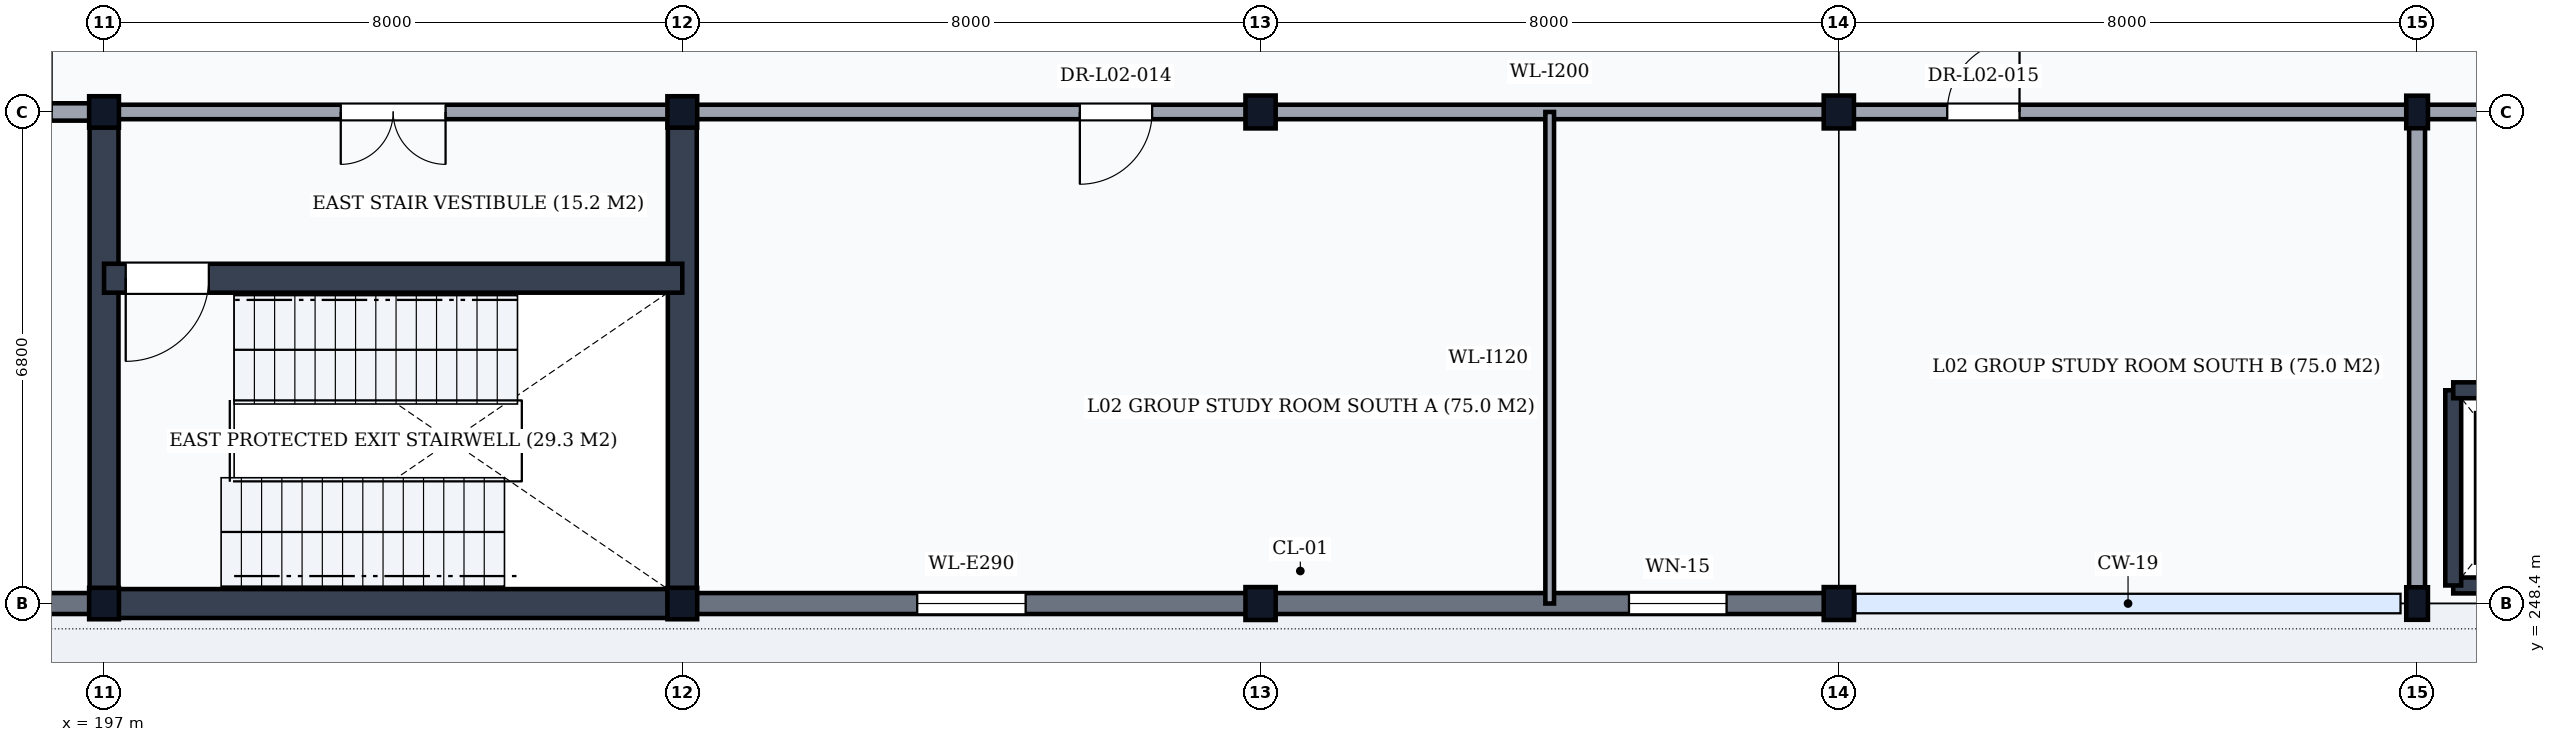
"""IFC4 building model, lengths in metres.
Left out: names, types, materials, properties, quantities, classifications, styles, units other than length and angle.
Written with IfcOpenShell. Run it as: python <this file> out.ifc"""

import sys

from ifc_helpers import new_model, si_unit, direction, frame, frame_2d, origin, origin_2d, place, context, subcontext, project, spatial, rectangle, i_section, extrude, element, fill, save


model = new_model("IFC4")
c1 = context("Model", 3, precision=1e-05, world=origin(), true_north=direction((0.0, 1.0)))
c2 = subcontext(c1, "Body", "Model", "MODEL_VIEW")
j1 = project(units=[si_unit("LENGTHUNIT", "METRE"), si_unit("PLANEANGLEUNIT", "RADIAN")], contexts=[c1])
p1 = place(None, origin())
s1 = spatial("IfcSite", under=j1, at=p1, CompositionType="ELEMENT")
p2 = place(p1, origin())
s2 = spatial("IfcBuilding", under=s1, at=p2, CompositionType="ELEMENT")
p3 = place(p2, frame((0.0, 0.0, 5.4)))
s3 = spatial("IfcBuildingStorey", under=s2, at=p3, CompositionType="ELEMENT", Elevation=5.4)
for number, where, z_axis, x_axis in (
    (1, (197.0, 248.4, 0.0), (0.0, 0.0, 1.0), (1.0, 0.0, 0.0)),
    (2, (197.0, 255.2, 0.0), (0.0, 0.0, 1.0), (1.0, 0.0, 0.0)),
    (3, (205.0, 248.4, 0.0), (0.0, 0.0, 1.0), (1.0, 0.0, 0.0)),
    (4, (205.0, 255.2, 0.0), (0.0, 0.0, 1.0), (1.0, 0.0, 0.0)),
):
    element("IfcColumn", number, at=place(p3, frame(where, z_axis=z_axis, x_axis=x_axis)), inside=s3, PredefinedType="COLUMN", context=c2, shape_type="SweptSolid", body=[
        extrude(i_section(OverallWidth=0.412, OverallDepth=0.435, WebThickness=0.036, FlangeThickness=0.057, FilletRadius=0.015, at=origin_2d()), origin(), (0.0, 0.0, 1.0), 5.1),
    ])
for number, where, z_axis, x_axis in (
    (5, (213.0, 248.4, 0.0), (0.0, 0.0, 1.0), (1.0, 0.0, 0.0)),
    (6, (213.0, 255.2, 0.0), (0.0, 0.0, 1.0), (1.0, 0.0, 0.0)),
    (7, (221.0, 248.4, 0.0), (0.0, 0.0, 1.0), (1.0, 0.0, 0.0)),
    (8, (221.0, 255.2, 0.0), (0.0, 0.0, 1.0), (1.0, 0.0, 0.0)),
):
    element("IfcColumn", number, at=place(p3, frame(where, z_axis=z_axis, x_axis=x_axis)), inside=s3, PredefinedType="COLUMN", context=c2, shape_type="SweptSolid", body=[
        extrude(i_section(OverallWidth=0.418, OverallDepth=0.455, WebThickness=0.042, FlangeThickness=0.068, FilletRadius=0.015, at=origin_2d()), origin(), (0.0, 0.0, 1.0), 5.1),
    ])
for number, where, z_axis, x_axis in (
    (9, (229.0, 248.4, 0.0), (0.0, 0.0, 1.0), (1.0, 0.0, 0.0)),
    (10, (229.0, 255.2, 0.0), (0.0, 0.0, 1.0), (1.0, 0.0, 0.0)),
):
    element("IfcColumn", number, at=place(p3, frame(where, z_axis=z_axis, x_axis=x_axis)), inside=s3, PredefinedType="COLUMN", context=c2, shape_type="SweptSolid", body=[
        extrude(i_section(OverallWidth=0.3, OverallDepth=0.45, WebThickness=0.014, FlangeThickness=0.026, FilletRadius=0.027, at=origin_2d()), origin(), (0.0, 0.0, 1.0), 5.1),
    ])
p4 = place(p3, frame((189.006, 248.4, 0.0), z_axis=(0.0, 0.0, 1.0), x_axis=(1.0, 0.0, 0.0)))
e11 = element("IfcWall", 11, at=p4, inside=s3, PredefinedType="SOLIDWALL", context=c2, shape_type="SweptSolid", body=[
    extrude(rectangle(XDim=7.988, YDim=0.29, at=frame_2d((3.994, 0.0))), origin(), (0.0, 0.0, 1.0), 4.548),
])
p5 = place(p3, frame((205.006, 248.4, 0.0), z_axis=(0.0, 0.0, 1.0), x_axis=(1.0, 0.0, 0.0)))
e12 = element("IfcWall", 12, at=p5, inside=s3, PredefinedType="SOLIDWALL", context=c2, shape_type="SweptSolid", body=[
    extrude(rectangle(XDim=7.988, YDim=0.29, at=frame_2d((3.994, 0.0))), origin(), (0.0, 0.0, 1.0), 4.548),
])
p6 = place(p5, frame((3.244, 0.0, 0.95)))
e13 = element("IfcOpeningElement", 13, at=p6, cuts=e12, PredefinedType="OPENING", context=c2, shape_type="SweptSolid", body=[
    extrude(rectangle(XDim=1.5, YDim=1.9, at=frame_2d((0.75, 0.95))), frame((0.0, 0.16, 0.0), z_axis=(0.0, -1.0, 0.0), x_axis=(1.0, 0.0, 0.0)), (0.0, 0.0, 1.0), 0.32),
])
p7 = place(p3, frame((213.006, 248.4, 0.0), z_axis=(0.0, 0.0, 1.0), x_axis=(1.0, 0.0, 0.0)))
e14 = element("IfcWall", 14, at=p7, inside=s3, PredefinedType="SOLIDWALL", context=c2, shape_type="SweptSolid", body=[
    extrude(rectangle(XDim=7.988, YDim=0.29, at=frame_2d((3.994, 0.0))), origin(), (0.0, 0.0, 1.0), 4.548),
])
p8 = place(p7, frame((5.091, 0.0, 0.95)))
e15 = element("IfcOpeningElement", 15, at=p8, cuts=e14, PredefinedType="OPENING", context=c2, shape_type="SweptSolid", body=[
    extrude(rectangle(XDim=1.35, YDim=1.8, at=frame_2d((0.675, 0.9))), frame((0.0, 0.16, 0.0), z_axis=(0.0, -1.0, 0.0), x_axis=(1.0, 0.0, 0.0)), (0.0, 0.0, 1.0), 0.32),
])
p9 = place(p3, frame((197.0, 248.4, 0.0), z_axis=(0.0, 0.0, 1.0), x_axis=(1.0, 0.0, 0.0)))
e16 = element("IfcWall", 16, at=p9, inside=s3, PredefinedType="SHEAR", context=c2, shape_type="SweptSolid", body=[
    extrude(rectangle(XDim=8.0, YDim=0.4, at=frame_2d((4.0, 0.0))), origin(), (0.0, 0.0, 1.0), 4.86),
])
for number, where, z_axis, x_axis in (
    (17, (197.0, 248.4, 0.0), (0.0, 0.0, 1.0), (0.0, 1.0, 0.0)),
    (18, (205.0, 248.4, 0.0), (0.0, 0.0, 1.0), (0.0, 1.0, 0.0)),
):
    element("IfcWall", number, at=place(p3, frame(where, z_axis=z_axis, x_axis=x_axis)), inside=s3, PredefinedType="SHEAR", context=c2, shape_type="SweptSolid", body=[
        extrude(rectangle(XDim=6.8, YDim=0.4, at=frame_2d((3.4, 0.0))), origin(), (0.0, 0.0, 1.0), 4.86),
    ])
p10 = place(p3, frame((197.0, 252.9, 0.0), z_axis=(0.0, 0.0, 1.0), x_axis=(1.0, 0.0, 0.0)))
e19 = element("IfcWall", 19, at=p10, inside=s3, PredefinedType="SHEAR", context=c2, shape_type="SweptSolid", body=[
    extrude(rectangle(XDim=8.0, YDim=0.4, at=frame_2d((4.0, 0.0))), origin(), (0.0, 0.0, 1.0), 4.86),
])
p11 = place(p10, frame((0.3, 0.0, 0.0)))
e20 = element("IfcOpeningElement", 20, at=p11, cuts=e19, PredefinedType="OPENING", context=c2, shape_type="SweptSolid", body=[
    extrude(rectangle(XDim=1.15, YDim=2.15, at=frame_2d((0.575, 1.075))), frame((0.0, 0.215, 0.0), z_axis=(0.0, -1.0, 0.0), x_axis=(1.0, 0.0, 0.0)), (0.0, 0.0, 1.0), 0.43),
])
p12 = place(p3, frame((197.0, 255.2, 0.0), z_axis=(0.0, 0.0, 1.0), x_axis=(1.0, 0.0, 0.0)))
e21 = element("IfcWall", 21, at=p12, inside=s3, PredefinedType="PARTITIONING", context=c2, shape_type="SweptSolid", body=[
    extrude(rectangle(XDim=8.0, YDim=0.2, at=frame_2d((4.0, 0.0))), origin(), (0.0, 0.0, 1.0), 4.358),
])
p13 = place(p12, frame((3.275, 0.0, 0.0)))
e22 = element("IfcOpeningElement", 22, at=p13, cuts=e21, PredefinedType="OPENING", context=c2, shape_type="SweptSolid", body=[
    extrude(rectangle(XDim=1.45, YDim=2.2, at=frame_2d((0.725, 1.1))), frame((0.0, 0.115, 0.0), z_axis=(0.0, -1.0, 0.0), x_axis=(1.0, 0.0, 0.0)), (0.0, 0.0, 1.0), 0.23),
])
p14 = place(p3, frame((229.5, 248.65, 0.0), z_axis=(0.0, 0.0, 1.0), x_axis=(1.0, 0.0, 0.0)))
e23 = element("IfcWall", 23, at=p14, inside=s3, PredefinedType="SHEAR", context=c2, shape_type="SweptSolid", body=[
    extrude(rectangle(XDim=2.2, YDim=0.22, at=frame_2d((1.1, 0.0))), origin(), (0.0, 0.0, 1.0), 4.86),
])
p15 = place(p3, frame((229.5, 248.65, 0.0), z_axis=(0.0, 0.0, 1.0), x_axis=(0.0, 1.0, 0.0)))
e24 = element("IfcWall", 24, at=p15, inside=s3, PredefinedType="SHEAR", context=c2, shape_type="SweptSolid", body=[
    extrude(rectangle(XDim=2.7, YDim=0.22, at=frame_2d((1.35, 0.0))), origin(), (0.0, 0.0, 1.0), 4.86),
])
p16 = place(p3, frame((229.5, 251.35, 0.0), z_axis=(0.0, 0.0, 1.0), x_axis=(1.0, 0.0, 0.0)))
e25 = element("IfcWall", 25, at=p16, inside=s3, PredefinedType="SHEAR", context=c2, shape_type="SweptSolid", body=[
    extrude(rectangle(XDim=2.2, YDim=0.22, at=frame_2d((1.1, 0.0))), origin(), (0.0, 0.0, 1.0), 4.86),
])
p17 = place(p16, frame((0.5, 0.0, 0.0)))
e26 = element("IfcOpeningElement", 26, at=p17, cuts=e25, PredefinedType="OPENING", context=c2, shape_type="SweptSolid", body=[
    extrude(rectangle(XDim=1.2, YDim=2.2, at=frame_2d((0.6, 1.1))), frame((0.0, 0.125, 0.0), z_axis=(0.0, -1.0, 0.0), x_axis=(1.0, 0.0, 0.0)), (0.0, 0.0, 1.0), 0.25),
])
p18 = place(p3, frame((189.0, 255.2, 0.0), z_axis=(0.0, 0.0, 1.0), x_axis=(1.0, 0.0, 0.0)))
e27 = element("IfcWall", 27, at=p18, inside=s3, PredefinedType="PARTITIONING", context=c2, shape_type="SweptSolid", body=[
    extrude(rectangle(XDim=8.0, YDim=0.24, at=frame_2d((4.0, 0.0))), origin(), (0.0, 0.0, 1.0), 4.358),
])
p19 = place(p18, frame((1.05, 0.0, 0.0)))
e28 = element("IfcOpeningElement", 28, at=p19, cuts=e27, PredefinedType="OPENING", context=c2, shape_type="SweptSolid", body=[
    extrude(rectangle(XDim=1.0, YDim=2.1, at=frame_2d((0.5, 1.05))), frame((0.0, 0.135, 0.0), z_axis=(0.0, -1.0, 0.0), x_axis=(1.0, 0.0, 0.0)), (0.0, 0.0, 1.0), 0.27),
])
p20 = place(p18, frame((3.6, 0.0, 0.0)))
e29 = element("IfcOpeningElement", 29, at=p20, cuts=e27, PredefinedType="OPENING", context=c2, shape_type="SweptSolid", body=[
    extrude(rectangle(XDim=1.5, YDim=2.25, at=frame_2d((0.75, 1.125))), frame((0.0, 0.135, 0.0), z_axis=(0.0, -1.0, 0.0), x_axis=(1.0, 0.0, 0.0)), (0.0, 0.0, 1.0), 0.27),
])
p21 = place(p18, frame((6.425, 0.0, 0.0)))
e30 = element("IfcOpeningElement", 30, at=p21, cuts=e27, PredefinedType="OPENING", context=c2, shape_type="SweptSolid", body=[
    extrude(rectangle(XDim=0.85, YDim=2.1, at=frame_2d((0.425, 1.05))), frame((0.0, 0.135, 0.0), z_axis=(0.0, -1.0, 0.0), x_axis=(1.0, 0.0, 0.0)), (0.0, 0.0, 1.0), 0.27),
])
p22 = place(p3, frame((229.0, 248.4, 0.0), z_axis=(0.0, 0.0, 1.0), x_axis=(0.0, 1.0, 0.0)))
e31 = element("IfcWall", 31, at=p22, inside=s3, PredefinedType="PARTITIONING", context=c2, shape_type="SweptSolid", body=[
    extrude(rectangle(XDim=6.8, YDim=0.22, at=frame_2d((3.4, 0.0))), origin(), (0.0, 0.0, 1.0), 4.498),
])
p23 = place(p3, frame((229.0, 255.2, 0.0), z_axis=(0.0, 0.0, 1.0), x_axis=(1.0, 0.0, 0.0)))
e32 = element("IfcWall", 32, at=p23, inside=s3, PredefinedType="PARTITIONING", context=c2, shape_type="SweptSolid", body=[
    extrude(rectangle(XDim=8.0, YDim=0.2, at=frame_2d((4.0, 0.0))), origin(), (0.0, 0.0, 1.0), 4.408),
])
p24 = place(p23, frame((3.1, 0.0, 0.0)))
e33 = element("IfcOpeningElement", 33, at=p24, cuts=e32, PredefinedType="OPENING", context=c2, shape_type="SweptSolid", body=[
    extrude(rectangle(XDim=1.8, YDim=2.4, at=frame_2d((0.9, 1.2))), frame((0.0, 0.115, 0.0), z_axis=(0.0, -1.0, 0.0), x_axis=(1.0, 0.0, 0.0)), (0.0, 0.0, 1.0), 0.23),
])
p25 = place(p3, frame((205.0, 255.2, 0.0), z_axis=(0.0, 0.0, 1.0), x_axis=(1.0, 0.0, 0.0)))
e34 = element("IfcWall", 34, at=p25, inside=s3, PredefinedType="PARTITIONING", context=c2, shape_type="SweptSolid", body=[
    extrude(rectangle(XDim=24.0, YDim=0.2, at=frame_2d((12.0, 0.0))), origin(), (0.0, 0.0, 1.0), 4.358),
])
p26 = place(p25, frame((5.5, 0.0, 0.0)))
e35 = element("IfcOpeningElement", 35, at=p26, cuts=e34, PredefinedType="OPENING", context=c2, shape_type="SweptSolid", body=[
    extrude(rectangle(XDim=1.0, YDim=2.1, at=frame_2d((0.5, 1.05))), frame((0.0, 0.115, 0.0), z_axis=(0.0, -1.0, 0.0), x_axis=(1.0, 0.0, 0.0)), (0.0, 0.0, 1.0), 0.23),
])
p27 = place(p25, frame((17.5, 0.0, 0.0)))
e36 = element("IfcOpeningElement", 36, at=p27, cuts=e34, PredefinedType="OPENING", context=c2, shape_type="SweptSolid", body=[
    extrude(rectangle(XDim=1.0, YDim=2.1, at=frame_2d((0.5, 1.05))), frame((0.0, 0.115, 0.0), z_axis=(0.0, -1.0, 0.0), x_axis=(1.0, 0.0, 0.0)), (0.0, 0.0, 1.0), 0.23),
])
p28 = place(p3, frame((217.0, 248.4, 0.0), z_axis=(0.0, 0.0, 1.0), x_axis=(0.0, 1.0, 0.0)))
e37 = element("IfcWall", 37, at=p28, inside=s3, PredefinedType="PARTITIONING", context=c2, shape_type="SweptSolid", body=[
    extrude(rectangle(XDim=6.8, YDim=0.12, at=frame_2d((3.4, 0.0))), origin(), (0.0, 0.0, 1.0), 4.618),
])
p29 = place(p6, origin())
e38 = element("IfcWindow", 38, at=p29, inside=s3, PartitioningType="SINGLE_PANEL", PredefinedType="WINDOW", context=c2, shape_type="SweptSolid", body=[
    extrude(rectangle(XDim=1.5, YDim=1.9, at=frame_2d((0.75, 0.95))), frame((0.0, 0.03, 0.0), z_axis=(0.0, -1.0, 0.0), x_axis=(1.0, 0.0, 0.0)), (0.0, 0.0, 1.0), 0.06),
])
fill(e13, e38)
p30 = place(p8, origin())
e39 = element("IfcWindow", 39, at=p30, inside=s3, PartitioningType="SINGLE_PANEL", PredefinedType="WINDOW", context=c2, shape_type="SweptSolid", body=[
    extrude(rectangle(XDim=1.35, YDim=1.8, at=frame_2d((0.675, 0.9))), frame((0.0, 0.03, 0.0), z_axis=(0.0, -1.0, 0.0), x_axis=(1.0, 0.0, 0.0)), (0.0, 0.0, 1.0), 0.06),
])
fill(e15, e39)
p31 = place(p11, frame((1.15, 0.0, 0.0), z_axis=(0.0, 0.0, 1.0), x_axis=(-1.0, 0.0, 0.0)))
e40 = element("IfcDoor", 40, at=p31, inside=s3, OperationType="SINGLE_SWING_RIGHT", PredefinedType="DOOR", context=c2, shape_type="SweptSolid", body=[
    extrude(rectangle(XDim=1.15, YDim=2.15, at=frame_2d((0.575, 1.075))), frame((0.0, 0.025, 0.0), z_axis=(0.0, -1.0, 0.0), x_axis=(1.0, 0.0, 0.0)), (0.0, 0.0, 1.0), 0.05),
])
fill(e20, e40)
p32 = place(p13, frame((1.45, 0.0, 0.0), z_axis=(0.0, 0.0, 1.0), x_axis=(-1.0, 0.0, 0.0)))
e41 = element("IfcDoor", 41, at=p32, inside=s3, OperationType="DOUBLE_DOOR_SINGLE_SWING", PredefinedType="DOOR", context=c2, shape_type="SweptSolid", body=[
    extrude(rectangle(XDim=1.45, YDim=2.2, at=frame_2d((0.725, 1.1))), frame((0.0, 0.025, 0.0), z_axis=(0.0, -1.0, 0.0), x_axis=(1.0, 0.0, 0.0)), (0.0, 0.0, 1.0), 0.05),
])
fill(e22, e41)
p33 = place(p26, frame((1.0, 0.0, 0.0), z_axis=(0.0, 0.0, 1.0), x_axis=(-1.0, 0.0, 0.0)))
e42 = element("IfcDoor", 42, at=p33, inside=s3, OperationType="SINGLE_SWING_RIGHT", PredefinedType="DOOR", context=c2, shape_type="SweptSolid", body=[
    extrude(rectangle(XDim=1.0, YDim=2.1, at=frame_2d((0.5, 1.05))), frame((0.0, 0.025, 0.0), z_axis=(0.0, -1.0, 0.0), x_axis=(1.0, 0.0, 0.0)), (0.0, 0.0, 1.0), 0.05),
])
fill(e35, e42)
p34 = place(p27, frame((1.0, 0.0, 0.0), z_axis=(0.0, 0.0, 1.0), x_axis=(-1.0, 0.0, 0.0)))
e43 = element("IfcDoor", 43, at=p34, inside=s3, OperationType="SINGLE_SWING_LEFT", PredefinedType="DOOR", context=c2, shape_type="SweptSolid", body=[
    extrude(rectangle(XDim=1.0, YDim=2.1, at=frame_2d((0.5, 1.05))), frame((0.0, 0.025, 0.0), z_axis=(0.0, -1.0, 0.0), x_axis=(1.0, 0.0, 0.0)), (0.0, 0.0, 1.0), 0.05),
])
fill(e36, e43)
save(model, sys.argv[1])
